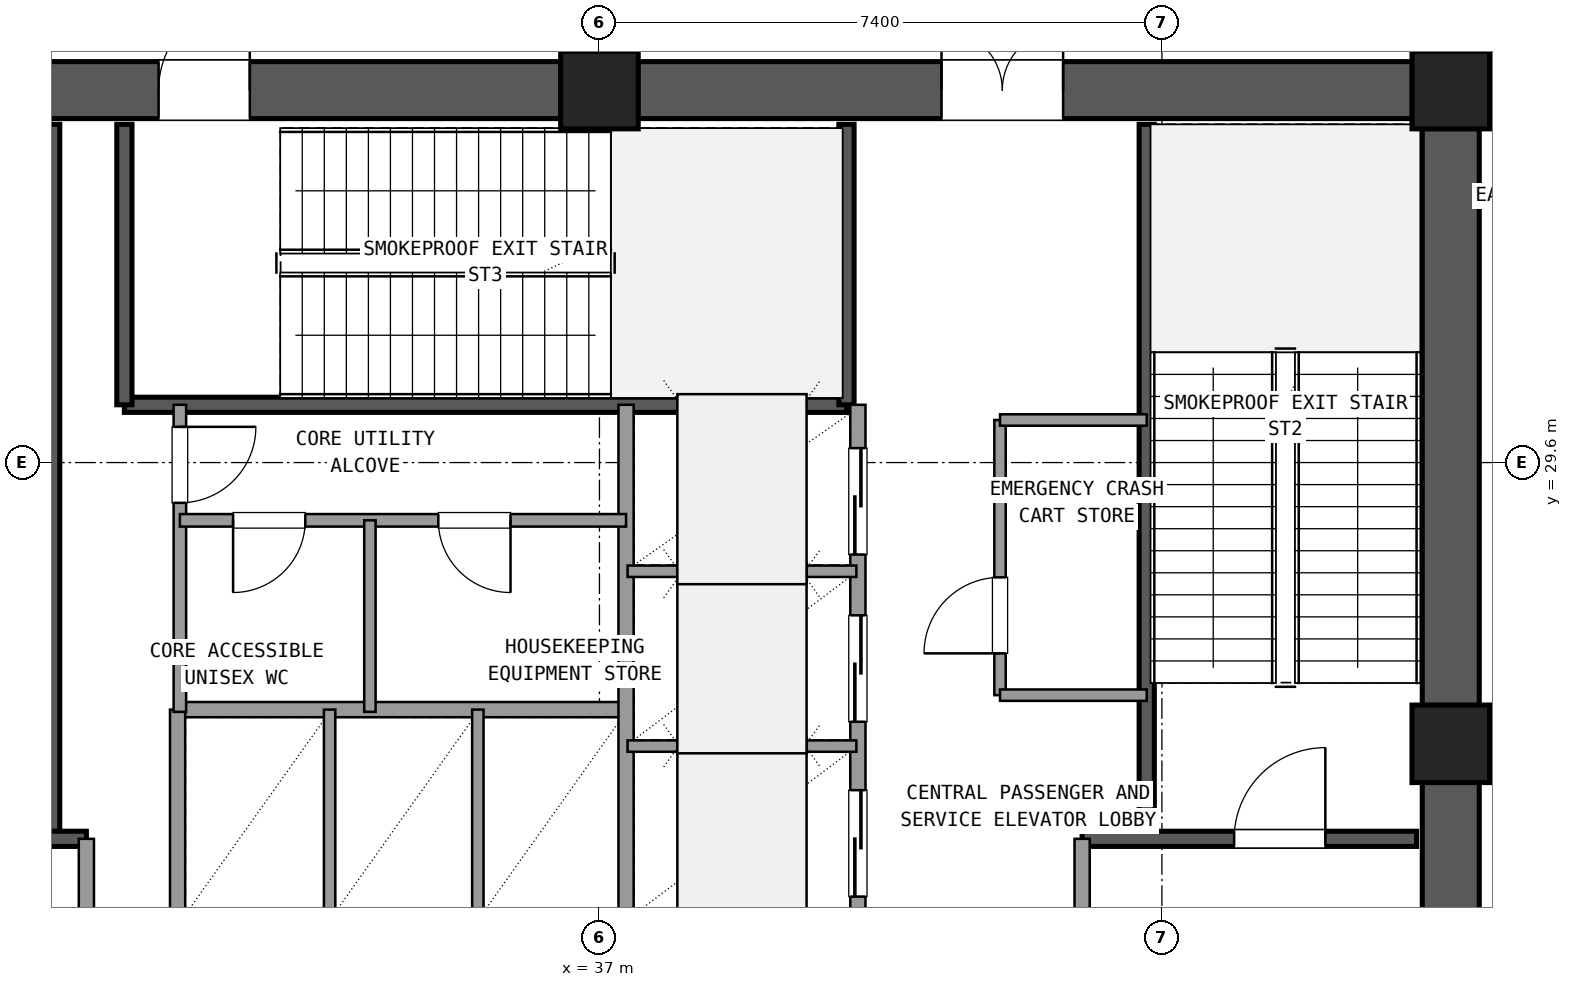
"""IFC4 building model, lengths in metres.
Left out: names, types, materials, properties, quantities, classifications, styles, units other than length and angle.
Written with IfcOpenShell. Run it as: python <this file> out.ifc"""

import sys

from ifc_helpers import new_model, si_unit, direction, frame, frame_2d, origin, origin_2d, place, context, subcontext, project, spatial, rectangle, extrude, element, fill, save


model = new_model("IFC4")
c1 = context("Model", 3, precision=1e-05, world=origin(), true_north=direction((0.0, 1.0)))
c2 = subcontext(c1, "Body", "Model", "MODEL_VIEW")
j1 = project(units=[si_unit("LENGTHUNIT", "METRE"), si_unit("PLANEANGLEUNIT", "RADIAN")], contexts=[c1])
p1 = place(None, origin())
s1 = spatial("IfcSite", under=j1, at=p1, CompositionType="ELEMENT")
p2 = place(p1, origin())
s2 = spatial("IfcBuilding", under=s1, at=p2, CompositionType="ELEMENT")
p3 = place(p2, frame((0.0, 0.0, 129.06)))
s3 = spatial("IfcBuildingStorey", under=s2, at=p3, CompositionType="ELEMENT", Elevation=129.06)
for number, where, z_axis, x_axis in (
    (1, (48.2, 25.9, 0.0), (0.0, 0.0, 1.0), (1.0, 0.0, 0.0)),
    (2, (48.2, 34.5, 0.0), (0.0, 0.0, 1.0), (1.0, 0.0, 0.0)),
    (3, (37.0, 34.5, 0.0), (0.0, 0.0, 1.0), (1.0, 0.0, 0.0)),
):
    element("IfcColumn", number, at=place(p3, frame(where, z_axis=z_axis, x_axis=x_axis)), inside=s3, PredefinedType="COLUMN", context=c2, shape_type="SweptSolid", body=[
        extrude(rectangle(XDim=1.02, YDim=1.02, at=origin_2d()), origin(), (0.0, 0.0, 1.0), 5.76),
    ])
p4 = place(p3, frame((48.2, 17.805, 0.0), z_axis=(0.0, 0.0, 1.0), x_axis=(0.0, 1.0, 0.0)))
e4 = element("IfcWall", 4, at=p4, inside=s3, PredefinedType="SHEAR", context=c2, shape_type="SweptSolid", body=[
    extrude(rectangle(XDim=7.59, YDim=0.75, at=frame_2d((3.795, 0.0))), origin(), (0.0, 0.0, 1.0), 5.48),
])
p5 = place(p4, frame((4.245, 0.0, 0.0)))
e5 = element("IfcOpeningElement", 5, at=p5, cuts=e4, PredefinedType="OPENING", context=c2, shape_type="SweptSolid", body=[
    extrude(rectangle(XDim=1.2, YDim=2.15, at=frame_2d((0.6, 1.075))), frame((0.0, 0.385, 0.0), z_axis=(0.0, -1.0, 0.0), x_axis=(1.0, 0.0, 0.0)), (0.0, 0.0, 1.0), 0.77),
])
p6 = place(p3, frame((48.2, 26.405, 0.0), z_axis=(0.0, 0.0, 1.0), x_axis=(0.0, 1.0, 0.0)))
e6 = element("IfcWall", 6, at=p6, inside=s3, PredefinedType="SHEAR", context=c2, shape_type="SweptSolid", body=[
    extrude(rectangle(XDim=7.59, YDim=0.75, at=frame_2d((3.795, 0.0))), origin(), (0.0, 0.0, 1.0), 5.48),
])
p7 = place(p3, frame((47.695, 34.5, 0.0), z_axis=(0.0, 0.0, 1.0), x_axis=(-1.0, 0.0, 0.0)))
e7 = element("IfcWall", 7, at=p7, inside=s3, PredefinedType="SHEAR", context=c2, shape_type="SweptSolid", body=[
    extrude(rectangle(XDim=10.19, YDim=0.75, at=frame_2d((5.095, 0.0))), origin(), (0.0, 0.0, 1.0), 5.48),
])
p8 = place(p7, frame((4.595, 0.0, 0.0)))
e8 = element("IfcOpeningElement", 8, at=p8, cuts=e7, PredefinedType="OPENING", context=c2, shape_type="SweptSolid", body=[
    extrude(rectangle(XDim=1.6, YDim=2.2, at=frame_2d((0.8, 1.1))), frame((0.0, 0.385, 0.0), z_axis=(0.0, -1.0, 0.0), x_axis=(1.0, 0.0, 0.0)), (0.0, 0.0, 1.0), 0.77),
])
p9 = place(p3, frame((36.495, 34.5, 0.0), z_axis=(0.0, 0.0, 1.0), x_axis=(-1.0, 0.0, 0.0)))
e9 = element("IfcWall", 9, at=p9, inside=s3, PredefinedType="SHEAR", context=c2, shape_type="SweptSolid", body=[
    extrude(rectangle(XDim=10.19, YDim=0.75, at=frame_2d((5.095, 0.0))), origin(), (0.0, 0.0, 1.0), 5.48),
])
p10 = place(p9, frame((4.095, 0.0, 0.0)))
e10 = element("IfcOpeningElement", 10, at=p10, cuts=e9, PredefinedType="OPENING", context=c2, shape_type="SweptSolid", body=[
    extrude(rectangle(XDim=1.2, YDim=2.15, at=frame_2d((0.6, 1.075))), frame((0.0, 0.385, 0.0), z_axis=(0.0, -1.0, 0.0), x_axis=(1.0, 0.0, 0.0)), (0.0, 0.0, 1.0), 0.77),
])
p11 = place(p3, frame((29.8, 24.65, 0.0), z_axis=(0.0, 0.0, 1.0), x_axis=(0.0, 1.0, 0.0)))
e11 = element("IfcWall", 11, at=p11, inside=s3, PredefinedType="SHEAR", context=c2, shape_type="SweptSolid", body=[
    extrude(rectangle(XDim=9.4, YDim=0.2, at=frame_2d((4.7, 0.0))), origin(), (0.0, 0.0, 1.0), 5.48),
])
p12 = place(p3, frame((26.25, 24.65, 0.0), z_axis=(0.0, 0.0, 1.0), x_axis=(1.0, 0.0, 0.0)))
e12 = element("IfcWall", 12, at=p12, inside=s3, PredefinedType="SHEAR", context=c2, shape_type="SweptSolid", body=[
    extrude(rectangle(XDim=4.0, YDim=0.2, at=frame_2d((2.0, 0.0))), origin(), (0.0, 0.0, 1.0), 5.48),
])
p13 = place(p12, frame((1.0, 0.0, 0.0)))
e13 = element("IfcOpeningElement", 13, at=p13, cuts=e12, PredefinedType="OPENING", context=c2, shape_type="SweptSolid", body=[
    extrude(rectangle(XDim=1.2, YDim=2.15, at=frame_2d((0.6, 1.075))), frame((0.0, 0.11, 0.0), z_axis=(0.0, -1.0, 0.0), x_axis=(1.0, 0.0, 0.0)), (0.0, 0.0, 1.0), 0.22),
])
p14 = place(p3, frame((44.2, 24.65, 0.0), z_axis=(0.0, 0.0, 1.0), x_axis=(0.0, 1.0, 0.0)))
e14 = element("IfcWall", 14, at=p14, inside=s3, PredefinedType="SHEAR", context=c2, shape_type="SweptSolid", body=[
    extrude(rectangle(XDim=9.4, YDim=0.2, at=frame_2d((4.7, 0.0))), origin(), (0.0, 0.0, 1.0), 5.48),
])
p15 = place(p3, frame((43.35, 24.65, 0.0), z_axis=(0.0, 0.0, 1.0), x_axis=(1.0, 0.0, 0.0)))
e15 = element("IfcWall", 15, at=p15, inside=s3, PredefinedType="SHEAR", context=c2, shape_type="SweptSolid", body=[
    extrude(rectangle(XDim=4.4, YDim=0.2, at=frame_2d((2.2, 0.0))), origin(), (0.0, 0.0, 1.0), 5.48),
])
p16 = place(p15, frame((2.0, 0.0, 0.0)))
e16 = element("IfcOpeningElement", 16, at=p16, cuts=e15, PredefinedType="OPENING", context=c2, shape_type="SweptSolid", body=[
    extrude(rectangle(XDim=1.2, YDim=2.15, at=frame_2d((0.6, 1.075))), frame((0.0, 0.11, 0.0), z_axis=(0.0, -1.0, 0.0), x_axis=(1.0, 0.0, 0.0)), (0.0, 0.0, 1.0), 0.22),
])
p17 = place(p3, frame((30.75, 30.36, 0.0), z_axis=(0.0, 0.0, 1.0), x_axis=(1.0, 0.0, 0.0)))
e17 = element("IfcWall", 17, at=p17, inside=s3, PredefinedType="SHEAR", context=c2, shape_type="SweptSolid", body=[
    extrude(rectangle(XDim=9.5, YDim=0.2, at=frame_2d((4.75, 0.0))), origin(), (0.0, 0.0, 1.0), 5.48),
])
for number, where, z_axis, x_axis in (
    (18, (30.75, 30.36, 0.0), (0.0, 0.0, 1.0), (0.0, 1.0, 0.0)),
    (19, (40.25, 30.36, 0.0), (0.0, 0.0, 1.0), (0.0, 1.0, 0.0)),
):
    element("IfcWall", number, at=place(p3, frame(where, z_axis=z_axis, x_axis=x_axis)), inside=s3, PredefinedType="SHEAR", context=c2, shape_type="SweptSolid", body=[
        extrude(rectangle(XDim=3.69, YDim=0.2, at=frame_2d((1.845, 0.0))), origin(), (0.0, 0.0, 1.0), 5.48),
    ])
p18 = place(p3, frame((30.25, 17.75, 0.0), z_axis=(0.0, 0.0, 1.0), x_axis=(0.0, 1.0, 0.0)))
e20 = element("IfcWall", 20, at=p18, inside=s3, PredefinedType="SOLIDWALL", context=c2, shape_type="SweptSolid", body=[
    extrude(rectangle(XDim=6.9, YDim=0.2, at=frame_2d((3.45, 0.0))), origin(), (0.0, 0.0, 1.0), 4.77),
])
p19 = place(p18, frame((4.15, 0.0, 0.0)))
e21 = element("IfcOpeningElement", 21, at=p19, cuts=e20, PredefinedType="OPENING", context=c2, shape_type="SweptSolid", body=[
    extrude(rectangle(XDim=1.2, YDim=2.15, at=frame_2d((0.6, 1.075))), frame((0.0, 0.11, 0.0), z_axis=(0.0, -1.0, 0.0), x_axis=(1.0, 0.0, 0.0)), (0.0, 0.0, 1.0), 0.22),
])
p20 = place(p3, frame((43.35, 17.75, 0.0), z_axis=(0.0, 0.0, 1.0), x_axis=(0.0, 1.0, 0.0)))
e22 = element("IfcWall", 22, at=p20, inside=s3, PredefinedType="SOLIDWALL", context=c2, shape_type="SweptSolid", body=[
    extrude(rectangle(XDim=6.9, YDim=0.2, at=frame_2d((3.45, 0.0))), origin(), (0.0, 0.0, 1.0), 4.77),
])
p21 = place(p20, frame((4.15, 0.0, 0.0)))
e23 = element("IfcOpeningElement", 23, at=p21, cuts=e22, PredefinedType="OPENING", context=c2, shape_type="SweptSolid", body=[
    extrude(rectangle(XDim=1.2, YDim=2.15, at=frame_2d((0.6, 1.075))), frame((0.0, 0.11, 0.0), z_axis=(0.0, -1.0, 0.0), x_axis=(1.0, 0.0, 0.0)), (0.0, 0.0, 1.0), 0.22),
])
p22 = place(p3, frame((31.45, 26.35, 0.0), z_axis=(0.0, 0.0, 1.0), x_axis=(1.0, 0.0, 0.0)))
e24 = element("IfcWall", 24, at=p22, inside=s3, PredefinedType="SOLIDWALL", context=c2, shape_type="SweptSolid", body=[
    extrude(rectangle(XDim=5.9, YDim=0.2, at=frame_2d((2.95, 0.0))), origin(), (0.0, 0.0, 1.0), 4.77),
])
p23 = place(p3, frame((31.45, 23.54, 0.0), z_axis=(0.0, 0.0, 1.0), x_axis=(0.0, 1.0, 0.0)))
e25 = element("IfcWall", 25, at=p23, inside=s3, PredefinedType="SOLIDWALL", context=c2, shape_type="SweptSolid", body=[
    extrude(rectangle(XDim=2.81, YDim=0.2, at=frame_2d((1.405, 0.0))), origin(), (0.0, 0.0, 1.0), 4.77),
])
for number, where, z_axis, x_axis in (
    (26, (33.45, 23.54, 0.0), (0.0, 0.0, 1.0), (0.0, 1.0, 0.0)),
    (27, (35.4, 23.54, 0.0), (0.0, 0.0, 1.0), (0.0, 1.0, 0.0)),
):
    element("IfcWall", number, at=place(p3, frame(where, z_axis=z_axis, x_axis=x_axis)), inside=s3, PredefinedType="PARTITIONING", context=c2, shape_type="SweptSolid", body=[
        extrude(rectangle(XDim=2.81, YDim=0.15, at=frame_2d((1.405, 0.0))), origin(), (0.0, 0.0, 1.0), 4.77),
    ])
p24 = place(p3, frame((37.35, 23.54, 0.0), z_axis=(0.0, 0.0, 1.0), x_axis=(0.0, 1.0, 0.0)))
e28 = element("IfcWall", 28, at=p24, inside=s3, PredefinedType="SOLIDWALL", context=c2, shape_type="SweptSolid", body=[
    extrude(rectangle(XDim=6.82, YDim=0.2, at=frame_2d((3.41, 0.0))), origin(), (0.0, 0.0, 1.0), 4.77),
])
p25 = place(p3, frame((40.4, 23.54, 0.0), z_axis=(0.0, 0.0, 1.0), x_axis=(0.0, 1.0, 0.0)))
e29 = element("IfcWall", 29, at=p25, inside=s3, PredefinedType="SOLIDWALL", context=c2, shape_type="SweptSolid", body=[
    extrude(rectangle(XDim=6.82, YDim=0.2, at=frame_2d((3.41, 0.0))), origin(), (0.0, 0.0, 1.0), 4.77),
])
p26 = place(p25, frame((0.35, 0.0, 0.0)))
e30 = element("IfcOpeningElement", 30, at=p26, cuts=e29, PredefinedType="OPENING", context=c2, shape_type="SweptSolid", body=[
    extrude(rectangle(XDim=1.4, YDim=2.2, at=frame_2d((0.7, 1.1))), frame((0.0, 0.11, 0.0), z_axis=(0.0, -1.0, 0.0), x_axis=(1.0, 0.0, 0.0)), (0.0, 0.0, 1.0), 0.22),
])
p27 = place(p25, frame((2.65, 0.0, 0.0)))
e31 = element("IfcOpeningElement", 31, at=p27, cuts=e29, PredefinedType="OPENING", context=c2, shape_type="SweptSolid", body=[
    extrude(rectangle(XDim=1.4, YDim=2.2, at=frame_2d((0.7, 1.1))), frame((0.0, 0.11, 0.0), z_axis=(0.0, -1.0, 0.0), x_axis=(1.0, 0.0, 0.0)), (0.0, 0.0, 1.0), 0.22),
])
p28 = place(p25, frame((4.85, 0.0, 0.0)))
e32 = element("IfcOpeningElement", 32, at=p28, cuts=e29, PredefinedType="OPENING", context=c2, shape_type="SweptSolid", body=[
    extrude(rectangle(XDim=1.4, YDim=2.2, at=frame_2d((0.7, 1.1))), frame((0.0, 0.11, 0.0), z_axis=(0.0, -1.0, 0.0), x_axis=(1.0, 0.0, 0.0)), (0.0, 0.0, 1.0), 0.22),
])
for number, where, z_axis, x_axis in (
    (33, (37.37, 25.87, 0.0), (0.0, 0.0, 1.0), (1.0, 0.0, 0.0)),
    (34, (37.37, 28.17, 0.0), (0.0, 0.0, 1.0), (1.0, 0.0, 0.0)),
):
    element("IfcWall", number, at=place(p3, frame(where, z_axis=z_axis, x_axis=x_axis)), inside=s3, PredefinedType="PARTITIONING", context=c2, shape_type="SweptSolid", body=[
        extrude(rectangle(XDim=3.01, YDim=0.15, at=frame_2d((1.505, 0.0))), origin(), (0.0, 0.0, 1.0), 4.77),
    ])
p29 = place(p3, frame((42.27, 26.54, 0.0), z_axis=(0.0, 0.0, 1.0), x_axis=(0.0, 1.0, 0.0)))
e35 = element("IfcWall", 35, at=p29, inside=s3, PredefinedType="PARTITIONING", context=c2, shape_type="SweptSolid", body=[
    extrude(rectangle(XDim=3.62, YDim=0.15, at=frame_2d((1.81, 0.0))), origin(), (0.0, 0.0, 1.0), 4.77),
])
p30 = place(p29, frame((0.55, 0.0, 0.0)))
e36 = element("IfcOpeningElement", 36, at=p30, cuts=e35, PredefinedType="OPENING", context=c2, shape_type="SweptSolid", body=[
    extrude(rectangle(XDim=1.0, YDim=2.15, at=frame_2d((0.5, 1.075))), frame((0.0, 0.085, 0.0), z_axis=(0.0, -1.0, 0.0), x_axis=(1.0, 0.0, 0.0)), (0.0, 0.0, 1.0), 0.17),
])
for number, where, z_axis, x_axis in (
    (37, (42.27, 26.54, 0.0), (0.0, 0.0, 1.0), (1.0, 0.0, 0.0)),
    (38, (42.27, 30.16, 0.0), (0.0, 0.0, 1.0), (1.0, 0.0, 0.0)),
):
    element("IfcWall", number, at=place(p3, frame(where, z_axis=z_axis, x_axis=x_axis)), inside=s3, PredefinedType="PARTITIONING", context=c2, shape_type="SweptSolid", body=[
        extrude(rectangle(XDim=1.93, YDim=0.15, at=frame_2d((0.965, 0.0))), origin(), (0.0, 0.0, 1.0), 4.77),
    ])
p31 = place(p3, frame((31.48, 26.32, 0.0), z_axis=(0.0, 0.0, 1.0), x_axis=(0.0, 1.0, 0.0)))
e39 = element("IfcWall", 39, at=p31, inside=s3, PredefinedType="PLUMBINGWALL", context=c2, shape_type="SweptSolid", body=[
    extrude(rectangle(XDim=4.04, YDim=0.165, at=frame_2d((2.02, 0.0))), origin(), (0.0, 0.0, 1.0), 4.77),
])
p32 = place(p31, frame((2.75, 0.0, 0.0)))
e40 = element("IfcOpeningElement", 40, at=p32, cuts=e39, PredefinedType="OPENING", context=c2, shape_type="SweptSolid", body=[
    extrude(rectangle(XDim=1.0, YDim=2.15, at=frame_2d((0.5, 1.075))), frame((0.0, 0.093, 0.0), z_axis=(0.0, -1.0, 0.0), x_axis=(1.0, 0.0, 0.0)), (0.0, 0.0, 1.0), 0.185),
])
p33 = place(p3, frame((31.48, 28.84, 0.0), z_axis=(0.0, 0.0, 1.0), x_axis=(1.0, 0.0, 0.0)))
e41 = element("IfcWall", 41, at=p33, inside=s3, PredefinedType="PLUMBINGWALL", context=c2, shape_type="SweptSolid", body=[
    extrude(rectangle(XDim=5.87, YDim=0.165, at=frame_2d((2.935, 0.0))), origin(), (0.0, 0.0, 1.0), 4.77),
])
p34 = place(p33, frame((0.7, 0.0, 0.0)))
e42 = element("IfcOpeningElement", 42, at=p34, cuts=e41, PredefinedType="OPENING", context=c2, shape_type="SweptSolid", body=[
    extrude(rectangle(XDim=0.95, YDim=2.1, at=frame_2d((0.475, 1.05))), frame((0.0, 0.093, 0.0), z_axis=(0.0, -1.0, 0.0), x_axis=(1.0, 0.0, 0.0)), (0.0, 0.0, 1.0), 0.185),
])
p35 = place(p33, frame((3.4, 0.0, 0.0)))
e43 = element("IfcOpeningElement", 43, at=p35, cuts=e41, PredefinedType="OPENING", context=c2, shape_type="SweptSolid", body=[
    extrude(rectangle(XDim=0.95, YDim=2.1, at=frame_2d((0.475, 1.05))), frame((0.0, 0.093, 0.0), z_axis=(0.0, -1.0, 0.0), x_axis=(1.0, 0.0, 0.0)), (0.0, 0.0, 1.0), 0.185),
])
p36 = place(p3, frame((33.98, 26.32, 0.0), z_axis=(0.0, 0.0, 1.0), x_axis=(0.0, 1.0, 0.0)))
e44 = element("IfcWall", 44, at=p36, inside=s3, PredefinedType="PARTITIONING", context=c2, shape_type="SweptSolid", body=[
    extrude(rectangle(XDim=2.52, YDim=0.15, at=frame_2d((1.26, 0.0))), origin(), (0.0, 0.0, 1.0), 4.77),
])
p37 = place(p3, frame((37.0, 34.95, 0.0), z_axis=(0.0, 0.0, 1.0), x_axis=(0.0, 1.0, 0.0)))
e45 = element("IfcWall", 45, at=p37, inside=s3, PredefinedType="PARTITIONING", context=c2, shape_type="SweptSolid", body=[
    extrude(rectangle(XDim=2.56, YDim=0.18, at=frame_2d((1.28, 0.0))), origin(), (0.0, 0.0, 1.0), 4.77),
])
p38 = place(p37, frame((0.28, 0.0, 0.0)))
e46 = element("IfcOpeningElement", 46, at=p38, cuts=e45, PredefinedType="OPENING", context=c2, shape_type="SweptSolid", body=[
    extrude(rectangle(XDim=2.0, YDim=2.2, at=frame_2d((1.0, 1.1))), frame((0.0, 0.1, 0.0), z_axis=(0.0, -1.0, 0.0), x_axis=(1.0, 0.0, 0.0)), (0.0, 0.0, 1.0), 0.2),
])
p39 = place(p16, origin())
e47 = element("IfcDoor", 47, at=p39, inside=s3, OperationType="SINGLE_SWING_RIGHT", PredefinedType="DOOR", context=c2, shape_type="SweptSolid", body=[
    extrude(rectangle(XDim=1.2, YDim=2.15, at=frame_2d((0.6, 1.075))), frame((0.0, 0.025, 0.0), z_axis=(0.0, -1.0, 0.0), x_axis=(1.0, 0.0, 0.0)), (0.0, 0.0, 1.0), 0.05),
])
fill(e16, e47)
p40 = place(p8, frame((1.6, 0.0, 0.0), z_axis=(0.0, 0.0, 1.0), x_axis=(-1.0, 0.0, 0.0)))
e48 = element("IfcDoor", 48, at=p40, inside=s3, OperationType="DOUBLE_DOOR_SINGLE_SWING", PredefinedType="DOOR", context=c2, shape_type="SweptSolid", body=[
    extrude(rectangle(XDim=1.6, YDim=2.2, at=frame_2d((0.8, 1.1))), frame((0.0, 0.025, 0.0), z_axis=(0.0, -1.0, 0.0), x_axis=(1.0, 0.0, 0.0)), (0.0, 0.0, 1.0), 0.05),
])
fill(e8, e48)
p41 = place(p10, frame((1.2, 0.0, 0.0), z_axis=(0.0, 0.0, 1.0), x_axis=(-1.0, 0.0, 0.0)))
e49 = element("IfcDoor", 49, at=p41, inside=s3, OperationType="SINGLE_SWING_LEFT", PredefinedType="DOOR", context=c2, shape_type="SweptSolid", body=[
    extrude(rectangle(XDim=1.2, YDim=2.15, at=frame_2d((0.6, 1.075))), frame((0.0, 0.025, 0.0), z_axis=(0.0, -1.0, 0.0), x_axis=(1.0, 0.0, 0.0)), (0.0, 0.0, 1.0), 0.05),
])
fill(e10, e49)
p42 = place(p26, origin())
e50 = element("IfcDoor", 50, at=p42, inside=s3, OperationType="SLIDING_TO_LEFT", PredefinedType="DOOR", context=c2, shape_type="SweptSolid", body=[
    extrude(rectangle(XDim=1.4, YDim=2.2, at=frame_2d((0.7, 1.1))), frame((0.0, 0.025, 0.0), z_axis=(0.0, -1.0, 0.0), x_axis=(1.0, 0.0, 0.0)), (0.0, 0.0, 1.0), 0.05),
])
fill(e30, e50)
p43 = place(p27, origin())
e51 = element("IfcDoor", 51, at=p43, inside=s3, OperationType="SLIDING_TO_LEFT", PredefinedType="DOOR", context=c2, shape_type="SweptSolid", body=[
    extrude(rectangle(XDim=1.4, YDim=2.2, at=frame_2d((0.7, 1.1))), frame((0.0, 0.025, 0.0), z_axis=(0.0, -1.0, 0.0), x_axis=(1.0, 0.0, 0.0)), (0.0, 0.0, 1.0), 0.05),
])
fill(e31, e51)
p44 = place(p28, origin())
e52 = element("IfcDoor", 52, at=p44, inside=s3, OperationType="SLIDING_TO_RIGHT", PredefinedType="DOOR", context=c2, shape_type="SweptSolid", body=[
    extrude(rectangle(XDim=1.4, YDim=2.2, at=frame_2d((0.7, 1.1))), frame((0.0, 0.025, 0.0), z_axis=(0.0, -1.0, 0.0), x_axis=(1.0, 0.0, 0.0)), (0.0, 0.0, 1.0), 0.05),
])
fill(e32, e52)
p45 = place(p30, origin())
e53 = element("IfcDoor", 53, at=p45, inside=s3, OperationType="SINGLE_SWING_LEFT", PredefinedType="DOOR", context=c2, shape_type="SweptSolid", body=[
    extrude(rectangle(XDim=1.0, YDim=2.15, at=frame_2d((0.5, 1.075))), frame((0.0, 0.025, 0.0), z_axis=(0.0, -1.0, 0.0), x_axis=(1.0, 0.0, 0.0)), (0.0, 0.0, 1.0), 0.05),
])
fill(e36, e53)
p46 = place(p32, frame((1.0, 0.0, 0.0), z_axis=(0.0, 0.0, 1.0), x_axis=(-1.0, 0.0, 0.0)))
e54 = element("IfcDoor", 54, at=p46, inside=s3, OperationType="SINGLE_SWING_RIGHT", PredefinedType="DOOR", context=c2, shape_type="SweptSolid", body=[
    extrude(rectangle(XDim=1.0, YDim=2.15, at=frame_2d((0.5, 1.075))), frame((0.0, 0.025, 0.0), z_axis=(0.0, -1.0, 0.0), x_axis=(1.0, 0.0, 0.0)), (0.0, 0.0, 1.0), 0.05),
])
fill(e40, e54)
p47 = place(p34, frame((0.95, 0.0, 0.0), z_axis=(0.0, 0.0, 1.0), x_axis=(-1.0, 0.0, 0.0)))
e55 = element("IfcDoor", 55, at=p47, inside=s3, OperationType="SINGLE_SWING_LEFT", PredefinedType="DOOR", context=c2, shape_type="SweptSolid", body=[
    extrude(rectangle(XDim=0.95, YDim=2.1, at=frame_2d((0.475, 1.05))), frame((0.0, 0.025, 0.0), z_axis=(0.0, -1.0, 0.0), x_axis=(1.0, 0.0, 0.0)), (0.0, 0.0, 1.0), 0.05),
])
fill(e42, e55)
p48 = place(p35, frame((0.95, 0.0, 0.0), z_axis=(0.0, 0.0, 1.0), x_axis=(-1.0, 0.0, 0.0)))
e56 = element("IfcDoor", 56, at=p48, inside=s3, OperationType="SINGLE_SWING_RIGHT", PredefinedType="DOOR", context=c2, shape_type="SweptSolid", body=[
    extrude(rectangle(XDim=0.95, YDim=2.1, at=frame_2d((0.475, 1.05))), frame((0.0, 0.025, 0.0), z_axis=(0.0, -1.0, 0.0), x_axis=(1.0, 0.0, 0.0)), (0.0, 0.0, 1.0), 0.05),
])
fill(e43, e56)
save(model, sys.argv[1])
